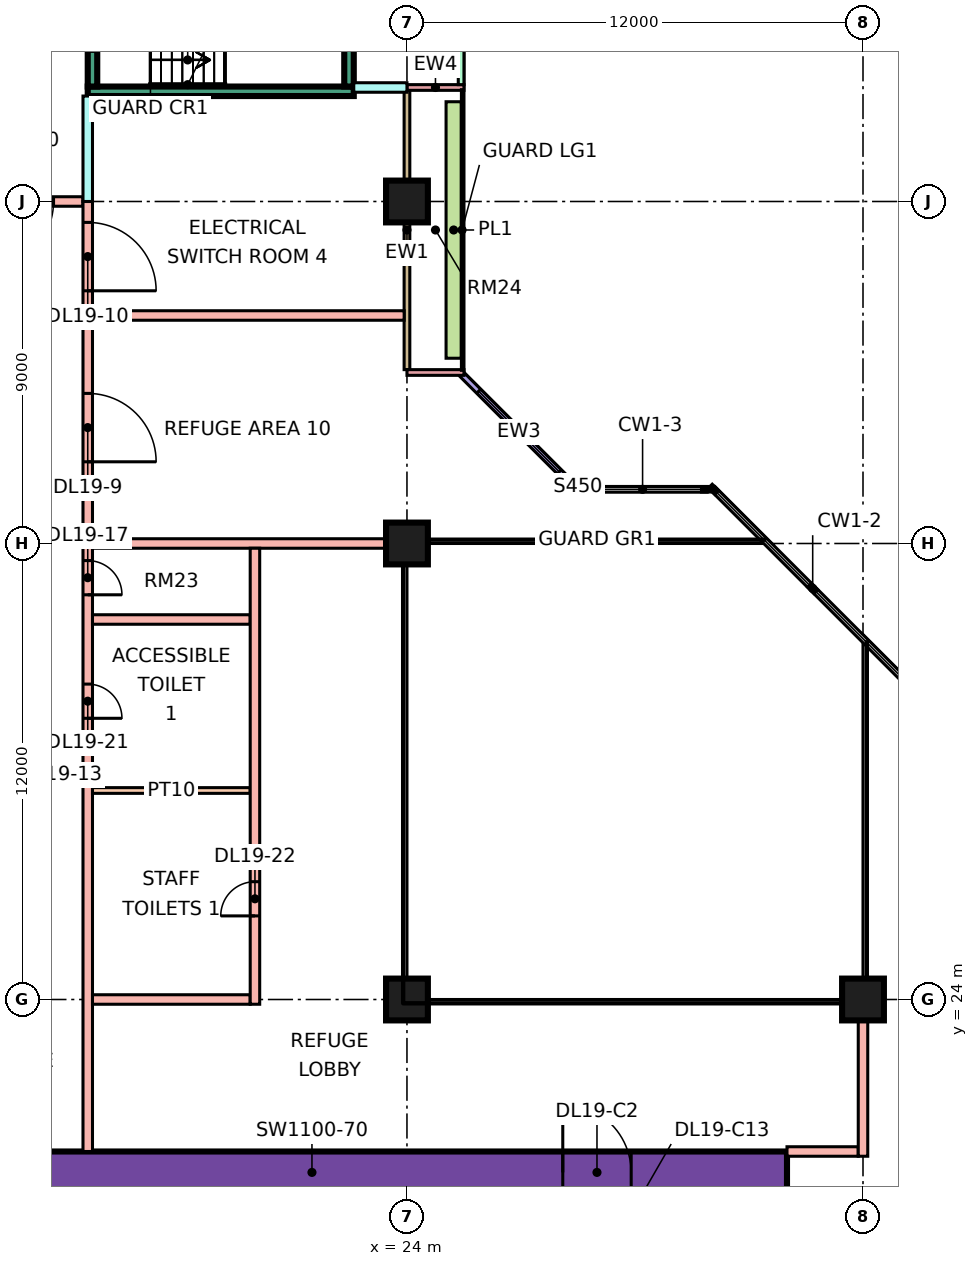
"""IFC4 building model, lengths in metres.
Left out: names, types, materials, properties, quantities, classifications, styles, units other than length and angle.
Written with IfcOpenShell. Run it as: python <this file> out.ifc"""

import sys

from ifc_helpers import new_model, si_unit, direction, frame, frame_2d, origin, origin_2d, place, context, subcontext, project, spatial, rectangle, extrude, element, fill, save


model = new_model("IFC4")
c1 = context("Model", 3, precision=1e-05, world=origin(), true_north=direction((0.0, 1.0)))
c2 = subcontext(c1, "Body", "Model", "MODEL_VIEW")
j1 = project(units=[si_unit("LENGTHUNIT", "METRE"), si_unit("PLANEANGLEUNIT", "RADIAN")], contexts=[c1])
p1 = place(None, origin())
s1 = spatial("IfcSite", under=j1, at=p1, CompositionType="ELEMENT")
p2 = place(p1, origin())
s2 = spatial("IfcBuilding", under=s1, at=p2, CompositionType="ELEMENT")
p3 = place(p2, frame((0.0, 0.0, 86.4)))
s3 = spatial("IfcBuildingStorey", under=s2, at=p3, CompositionType="ELEMENT", Elevation=86.4)
for number, where, z_axis, x_axis in (
    (1, (24.0, 24.0, 0.0), (0.0, 0.0, 1.0), (1.0, 0.0, 0.0)),
    (2, (24.0, 36.0, 0.0), (0.0, 0.0, 1.0), (1.0, 0.0, 0.0)),
    (3, (24.0, 45.0, 0.0), (0.0, 0.0, 1.0), (1.0, 0.0, 0.0)),
    (4, (36.0, 24.0, 0.0), (0.0, 0.0, 1.0), (1.0, 0.0, 0.0)),
):
    element("IfcColumn", number, at=place(p3, frame(where, z_axis=z_axis, x_axis=x_axis)), inside=s3, PredefinedType="COLUMN", context=c2, shape_type="SweptSolid", body=[
        extrude(rectangle(XDim=1.1, YDim=1.1, at=origin_2d()), origin(), (0.0, 0.0, 1.0), 5.5),
    ])
p4 = place(p3, frame((9.0, 19.45, 0.0), z_axis=(0.0, 0.0, 1.0), x_axis=(1.0, 0.0, 0.0)))
e5 = element("IfcWall", 5, at=p4, inside=s3, PredefinedType="SHEAR", context=c2, shape_type="SweptSolid", body=[
    extrude(rectangle(XDim=25.0, YDim=1.1, at=frame_2d((12.5, 0.0))), origin(), (0.0, 0.0, 1.0), 5.5),
])
p5 = place(p4, frame((19.1, 0.0, 0.0)))
e6 = element("IfcOpeningElement", 6, at=p5, cuts=e5, PredefinedType="OPENING", context=c2, shape_type="SweptSolid", body=[
    extrude(rectangle(XDim=1.8, YDim=2.4, at=frame_2d((0.9, 1.2))), frame((0.0, 0.56, 0.0), z_axis=(0.0, -1.0, 0.0), x_axis=(1.0, 0.0, 0.0)), (0.0, 0.0, 1.0), 1.12),
])
p6 = place(p3, frame((15.6, 47.9, 0.0), z_axis=(0.0, 0.0, 1.0), x_axis=(1.0, 0.0, 0.0)))
e7 = element("IfcWall", 7, at=p6, inside=s3, PredefinedType="SHEAR", context=c2, shape_type="SweptSolid", body=[
    extrude(rectangle(XDim=7.0, YDim=0.25, at=frame_2d((3.5, 0.0))), origin(), (0.0, 0.0, 1.0), 5.5),
])
p7 = place(p3, frame((15.725, 48.025, 0.0), z_axis=(0.0, 0.0, 1.0), x_axis=(0.0, 1.0, 0.0)))
e8 = element("IfcWall", 8, at=p7, inside=s3, PredefinedType="SHEAR", context=c2, shape_type="SweptSolid", body=[
    extrude(rectangle(XDim=2.95, YDim=0.25, at=frame_2d((1.475, 0.0))), origin(), (0.0, 0.0, 1.0), 5.5),
])
p8 = place(p7, frame((0.925, 0.0, 0.0)))
e9 = element("IfcOpeningElement", 9, at=p8, cuts=e8, PredefinedType="OPENING", context=c2, shape_type="SweptSolid", body=[
    extrude(rectangle(XDim=1.1, YDim=2.2, at=frame_2d((0.55, 1.1))), frame((0.0, 0.135, 0.0), z_axis=(0.0, -1.0, 0.0), x_axis=(1.0, 0.0, 0.0)), (0.0, 0.0, 1.0), 0.27),
])
p9 = place(p3, frame((22.475, 48.025, 0.0), z_axis=(0.0, 0.0, 1.0), x_axis=(0.0, 1.0, 0.0)))
e10 = element("IfcWall", 10, at=p9, inside=s3, PredefinedType="SHEAR", context=c2, shape_type="SweptSolid", body=[
    extrude(rectangle(XDim=2.95, YDim=0.25, at=frame_2d((1.475, 0.0))), origin(), (0.0, 0.0, 1.0), 5.5),
])
p10 = place(p3, frame((28.447, 37.447, 0.0), z_axis=(0.0, 0.0, 1.0), x_axis=(-0.707106781187, 0.707106781187, 0.0)))
e11 = element("IfcWall", 11, at=p10, inside=s3, PredefinedType="SOLIDWALL", context=c2, shape_type="SweptSolid", body=[
    extrude(rectangle(XDim=4.243, YDim=0.15, at=frame_2d((2.121, 0.0))), origin(), (0.0, 0.0, 1.0), 5.1),
])
p11 = place(p10, frame((0.621, 0.0, 0.45)))
e12 = element("IfcOpeningElement", 12, at=p11, cuts=e11, PredefinedType="OPENING", context=c2, shape_type="SweptSolid", body=[
    extrude(rectangle(XDim=3.0, YDim=3.6, at=frame_2d((1.5, 1.8))), frame((0.0, 0.085, 0.0), z_axis=(0.0, -1.0, 0.0), x_axis=(1.0, 0.0, 0.0)), (0.0, 0.0, 1.0), 0.17),
])
p12 = place(p3, frame((24.0, 40.575, 0.0), z_axis=(0.0, 0.0, 1.0), x_axis=(0.0, 1.0, 0.0)))
e13 = element("IfcWall", 13, at=p12, inside=s3, PredefinedType="SOLIDWALL", context=c2, shape_type="SweptSolid", body=[
    extrude(rectangle(XDim=7.35, YDim=0.15, at=frame_2d((3.675, 0.0))), origin(), (0.0, 0.0, 1.0), 5.1),
])
for number, where, z_axis, x_axis in (
    (14, (25.5, 40.5, 0.0), (0.0, 0.0, 1.0), (-1.0, 0.0, 0.0)),
    (15, (25.5, 48.0, 0.0), (0.0, 0.0, 1.0), (-1.0, 0.0, 0.0)),
):
    element("IfcWall", number, at=place(p3, frame(where, z_axis=z_axis, x_axis=x_axis)), inside=s3, PredefinedType="SOLIDWALL", context=c2, shape_type="SweptSolid", body=[
        extrude(rectangle(XDim=1.5, YDim=0.15, at=frame_2d((0.75, 0.0))), origin(), (0.0, 0.0, 1.0), 5.1),
    ])
p13 = place(p3, frame((25.425, 48.075, 0.0), z_axis=(0.0, 0.0, 1.0), x_axis=(0.0, 1.0, 0.0)))
e16 = element("IfcWall", 16, at=p13, inside=s3, PredefinedType="SOLIDWALL", context=c2, shape_type="SweptSolid", body=[
    extrude(rectangle(XDim=13.425, YDim=0.15, at=frame_2d((6.712, 0.0))), origin(), (0.0, 0.0, 1.0), 5.1),
])
p14 = place(p3, frame((25.229, 40.875, 0.0), z_axis=(0.0, 0.0, 1.0), x_axis=(0.0, 1.0, 0.0)))
e17 = element("IfcWall", 17, at=p14, inside=s3, PredefinedType="SOLIDWALL", context=c2, shape_type="SweptSolid", body=[
    extrude(rectangle(XDim=6.75, YDim=0.4, at=frame_2d((3.375, 0.0))), origin(), (0.0, 0.0, 1.0), 0.7),
])
p15 = place(p3, frame((12.399, 45.0, 0.0), z_axis=(0.0, 0.0, 1.0), x_axis=(1.0, 0.0, 0.0)))
e18 = element("IfcWall", 18, at=p15, inside=s3, PredefinedType="PARTITIONING", context=c2, shape_type="SweptSolid", body=[
    extrude(rectangle(XDim=3.076, YDim=0.25, at=frame_2d((1.538, 0.0))), origin(), (0.0, 0.0, 1.0), 5.1),
])
p16 = place(p15, frame((0.501, 0.0, 0.0)))
e19 = element("IfcOpeningElement", 19, at=p16, cuts=e18, PredefinedType="OPENING", context=c2, shape_type="SweptSolid", body=[
    extrude(rectangle(XDim=1.8, YDim=2.1, at=frame_2d((0.9, 1.05))), frame((0.0, 0.135, 0.0), z_axis=(0.0, -1.0, 0.0), x_axis=(1.0, 0.0, 0.0)), (0.0, 0.0, 1.0), 0.27),
])
p17 = place(p3, frame((15.6, 20.0, 0.0), z_axis=(0.0, 0.0, 1.0), x_axis=(0.0, 1.0, 0.0)))
e20 = element("IfcWall", 20, at=p17, inside=s3, PredefinedType="PARTITIONING", context=c2, shape_type="SweptSolid", body=[
    extrude(rectangle(XDim=25.0, YDim=0.25, at=frame_2d((12.5, 0.0))), origin(), (0.0, 0.0, 1.0), 5.1),
])
p18 = place(p17, frame((18.15, 0.0, 0.0)))
e21 = element("IfcOpeningElement", 21, at=p18, cuts=e20, PredefinedType="OPENING", context=c2, shape_type="SweptSolid", body=[
    extrude(rectangle(XDim=1.8, YDim=2.1, at=frame_2d((0.9, 1.05))), frame((0.0, 0.135, 0.0), z_axis=(0.0, -1.0, 0.0), x_axis=(1.0, 0.0, 0.0)), (0.0, 0.0, 1.0), 0.27),
])
p19 = place(p17, frame((22.65, 0.0, 0.0)))
e22 = element("IfcOpeningElement", 22, at=p19, cuts=e20, PredefinedType="OPENING", context=c2, shape_type="SweptSolid", body=[
    extrude(rectangle(XDim=1.8, YDim=2.1, at=frame_2d((0.9, 1.05))), frame((0.0, 0.135, 0.0), z_axis=(0.0, -1.0, 0.0), x_axis=(1.0, 0.0, 0.0)), (0.0, 0.0, 1.0), 0.27),
])
p20 = place(p17, frame((14.65, 0.0, 0.0)))
e23 = element("IfcOpeningElement", 23, at=p20, cuts=e20, PredefinedType="OPENING", context=c2, shape_type="SweptSolid", body=[
    extrude(rectangle(XDim=0.9, YDim=2.1, at=frame_2d((0.45, 1.05))), frame((0.0, 0.135, 0.0), z_axis=(0.0, -1.0, 0.0), x_axis=(1.0, 0.0, 0.0)), (0.0, 0.0, 1.0), 0.27),
])
p21 = place(p17, frame((11.4, 0.0, 0.0)))
e24 = element("IfcOpeningElement", 24, at=p21, cuts=e20, PredefinedType="OPENING", context=c2, shape_type="SweptSolid", body=[
    extrude(rectangle(XDim=0.9, YDim=2.1, at=frame_2d((0.45, 1.05))), frame((0.0, 0.135, 0.0), z_axis=(0.0, -1.0, 0.0), x_axis=(1.0, 0.0, 0.0)), (0.0, 0.0, 1.0), 0.27),
])
p22 = place(p3, frame((15.6, 45.0, 0.0), z_axis=(0.0, 0.0, 1.0), x_axis=(0.0, 1.0, 0.0)))
e25 = element("IfcWall", 25, at=p22, inside=s3, PredefinedType="PARTITIONING", context=c2, shape_type="SweptSolid", body=[
    extrude(rectangle(XDim=2.775, YDim=0.25, at=frame_2d((1.387, 0.0))), origin(), (0.0, 0.0, 1.0), 5.1),
])
p23 = place(p3, frame((15.725, 24.0, 0.0), z_axis=(0.0, 0.0, 1.0), x_axis=(1.0, 0.0, 0.0)))
e26 = element("IfcWall", 26, at=p23, inside=s3, PredefinedType="PARTITIONING", context=c2, shape_type="SweptSolid", body=[
    extrude(rectangle(XDim=4.15, YDim=0.25, at=frame_2d((2.075, 0.0))), origin(), (0.0, 0.0, 1.0), 5.1),
])
p24 = place(p3, frame((15.725, 29.5, 0.0), z_axis=(0.0, 0.0, 1.0), x_axis=(1.0, 0.0, 0.0)))
e27 = element("IfcWall", 27, at=p24, inside=s3, PredefinedType="PARTITIONING", context=c2, shape_type="SweptSolid", body=[
    extrude(rectangle(XDim=4.15, YDim=0.15, at=frame_2d((2.075, 0.0))), origin(), (0.0, 0.0, 1.0), 5.1),
])
p25 = place(p3, frame((15.725, 34.0, 0.0), z_axis=(0.0, 0.0, 1.0), x_axis=(1.0, 0.0, 0.0)))
e28 = element("IfcWall", 28, at=p25, inside=s3, PredefinedType="PARTITIONING", context=c2, shape_type="SweptSolid", body=[
    extrude(rectangle(XDim=4.15, YDim=0.25, at=frame_2d((2.075, 0.0))), origin(), (0.0, 0.0, 1.0), 5.1),
])
p26 = place(p3, frame((15.725, 36.0, 0.0), z_axis=(0.0, 0.0, 1.0), x_axis=(1.0, 0.0, 0.0)))
e29 = element("IfcWall", 29, at=p26, inside=s3, PredefinedType="PARTITIONING", context=c2, shape_type="SweptSolid", body=[
    extrude(rectangle(XDim=8.275, YDim=0.25, at=frame_2d((4.137, 0.0))), origin(), (0.0, 0.0, 1.0), 5.1),
])
p27 = place(p3, frame((15.725, 42.0, 0.0), z_axis=(0.0, 0.0, 1.0), x_axis=(1.0, 0.0, 0.0)))
e30 = element("IfcWall", 30, at=p27, inside=s3, PredefinedType="PARTITIONING", context=c2, shape_type="SweptSolid", body=[
    extrude(rectangle(XDim=8.201, YDim=0.25, at=frame_2d((4.101, 0.0))), origin(), (0.0, 0.0, 1.0), 5.1),
])
p28 = place(p3, frame((20.0, 23.875, 0.0), z_axis=(0.0, 0.0, 1.0), x_axis=(0.0, 1.0, 0.0)))
e31 = element("IfcWall", 31, at=p28, inside=s3, PredefinedType="PARTITIONING", context=c2, shape_type="SweptSolid", body=[
    extrude(rectangle(XDim=12.0, YDim=0.25, at=frame_2d((6.0, 0.0))), origin(), (0.0, 0.0, 1.0), 5.1),
])
p29 = place(p28, frame((2.325, 0.0, 0.0)))
e32 = element("IfcOpeningElement", 32, at=p29, cuts=e31, PredefinedType="OPENING", context=c2, shape_type="SweptSolid", body=[
    extrude(rectangle(XDim=0.9, YDim=2.1, at=frame_2d((0.45, 1.05))), frame((0.0, 0.135, 0.0), z_axis=(0.0, -1.0, 0.0), x_axis=(1.0, 0.0, 0.0)), (0.0, 0.0, 1.0), 0.27),
])
p30 = place(p3, frame((22.6, 48.0, 0.0), z_axis=(0.0, 0.0, 1.0), x_axis=(1.0, 0.0, 0.0)))
e33 = element("IfcWall", 33, at=p30, inside=s3, PredefinedType="PARTITIONING", context=c2, shape_type="SweptSolid", body=[
    extrude(rectangle(XDim=1.4, YDim=0.25, at=frame_2d((0.7, 0.0))), origin(), (0.0, 0.0, 1.0), 5.1),
])
p31 = place(p3, frame((34.0, 20.0, 0.0), z_axis=(0.0, 0.0, 1.0), x_axis=(1.0, 0.0, 0.0)))
e34 = element("IfcWall", 34, at=p31, inside=s3, PredefinedType="PARTITIONING", context=c2, shape_type="SweptSolid", body=[
    extrude(rectangle(XDim=1.875, YDim=0.25, at=frame_2d((0.938, 0.0))), origin(), (0.0, 0.0, 1.0), 5.1),
])
p32 = place(p3, frame((36.0, 19.875, 0.0), z_axis=(0.0, 0.0, 1.0), x_axis=(0.0, 1.0, 0.0)))
e35 = element("IfcWall", 35, at=p32, inside=s3, PredefinedType="PARTITIONING", context=c2, shape_type="SweptSolid", body=[
    extrude(rectangle(XDim=4.125, YDim=0.25, at=frame_2d((2.062, 0.0))), origin(), (0.0, 0.0, 1.0), 5.1),
])
p33 = place(p11, origin())
e36 = element("IfcWindow", 36, at=p33, inside=s3, PartitioningType="SINGLE_PANEL", PredefinedType="WINDOW", context=c2, shape_type="SweptSolid", body=[
    extrude(rectangle(XDim=3.0, YDim=3.6, at=frame_2d((1.5, 1.8))), frame((0.0, 0.03, 0.0), z_axis=(0.0, -1.0, 0.0), x_axis=(1.0, 0.0, 0.0)), (0.0, 0.0, 1.0), 0.06),
])
fill(e12, e36)
p34 = place(p5, origin())
e37 = element("IfcDoor", 37, at=p34, inside=s3, OperationType="DOUBLE_DOOR_SINGLE_SWING", PredefinedType="DOOR", context=c2, shape_type="SweptSolid", body=[
    extrude(rectangle(XDim=1.8, YDim=2.4, at=frame_2d((0.9, 1.2))), frame((0.0, 0.025, 0.0), z_axis=(0.0, -1.0, 0.0), x_axis=(1.0, 0.0, 0.0)), (0.0, 0.0, 1.0), 0.05),
])
fill(e6, e37)
p35 = place(p18, frame((1.8, 0.0, 0.0), z_axis=(0.0, 0.0, 1.0), x_axis=(-1.0, 0.0, 0.0)))
e38 = element("IfcDoor", 38, at=p35, inside=s3, OperationType="DOUBLE_DOOR_SINGLE_SWING", PredefinedType="DOOR", context=c2, shape_type="SweptSolid", body=[
    extrude(rectangle(XDim=1.8, YDim=2.1, at=frame_2d((0.9, 1.05))), frame((0.0, 0.025, 0.0), z_axis=(0.0, -1.0, 0.0), x_axis=(1.0, 0.0, 0.0)), (0.0, 0.0, 1.0), 0.05),
])
fill(e21, e38)
p36 = place(p19, frame((1.8, 0.0, 0.0), z_axis=(0.0, 0.0, 1.0), x_axis=(-1.0, 0.0, 0.0)))
e39 = element("IfcDoor", 39, at=p36, inside=s3, OperationType="DOUBLE_DOOR_SINGLE_SWING", PredefinedType="DOOR", context=c2, shape_type="SweptSolid", body=[
    extrude(rectangle(XDim=1.8, YDim=2.1, at=frame_2d((0.9, 1.05))), frame((0.0, 0.025, 0.0), z_axis=(0.0, -1.0, 0.0), x_axis=(1.0, 0.0, 0.0)), (0.0, 0.0, 1.0), 0.05),
])
fill(e22, e39)
p37 = place(p20, frame((0.9, 0.0, 0.0), z_axis=(0.0, 0.0, 1.0), x_axis=(-1.0, 0.0, 0.0)))
e40 = element("IfcDoor", 40, at=p37, inside=s3, OperationType="SINGLE_SWING_LEFT", PredefinedType="DOOR", context=c2, shape_type="SweptSolid", body=[
    extrude(rectangle(XDim=0.9, YDim=2.1, at=frame_2d((0.45, 1.05))), frame((0.0, 0.025, 0.0), z_axis=(0.0, -1.0, 0.0), x_axis=(1.0, 0.0, 0.0)), (0.0, 0.0, 1.0), 0.05),
])
fill(e23, e40)
p38 = place(p16, frame((1.8, 0.0, 0.0), z_axis=(0.0, 0.0, 1.0), x_axis=(-1.0, 0.0, 0.0)))
e41 = element("IfcDoor", 41, at=p38, inside=s3, OperationType="DOUBLE_DOOR_SINGLE_SWING", PredefinedType="DOOR", context=c2, shape_type="SweptSolid", body=[
    extrude(rectangle(XDim=1.8, YDim=2.1, at=frame_2d((0.9, 1.05))), frame((0.0, 0.025, 0.0), z_axis=(0.0, -1.0, 0.0), x_axis=(1.0, 0.0, 0.0)), (0.0, 0.0, 1.0), 0.05),
])
fill(e19, e41)
p39 = place(p21, frame((0.9, 0.0, 0.0), z_axis=(0.0, 0.0, 1.0), x_axis=(-1.0, 0.0, 0.0)))
e42 = element("IfcDoor", 42, at=p39, inside=s3, OperationType="SINGLE_SWING_LEFT", PredefinedType="DOOR", context=c2, shape_type="SweptSolid", body=[
    extrude(rectangle(XDim=0.9, YDim=2.1, at=frame_2d((0.45, 1.05))), frame((0.0, 0.025, 0.0), z_axis=(0.0, -1.0, 0.0), x_axis=(1.0, 0.0, 0.0)), (0.0, 0.0, 1.0), 0.05),
])
fill(e24, e42)
p40 = place(p29, origin())
e43 = element("IfcDoor", 43, at=p40, inside=s3, OperationType="SINGLE_SWING_LEFT", PredefinedType="DOOR", context=c2, shape_type="SweptSolid", body=[
    extrude(rectangle(XDim=0.9, YDim=2.1, at=frame_2d((0.45, 1.05))), frame((0.0, 0.025, 0.0), z_axis=(0.0, -1.0, 0.0), x_axis=(1.0, 0.0, 0.0)), (0.0, 0.0, 1.0), 0.05),
])
fill(e32, e43)
save(model, sys.argv[1])
